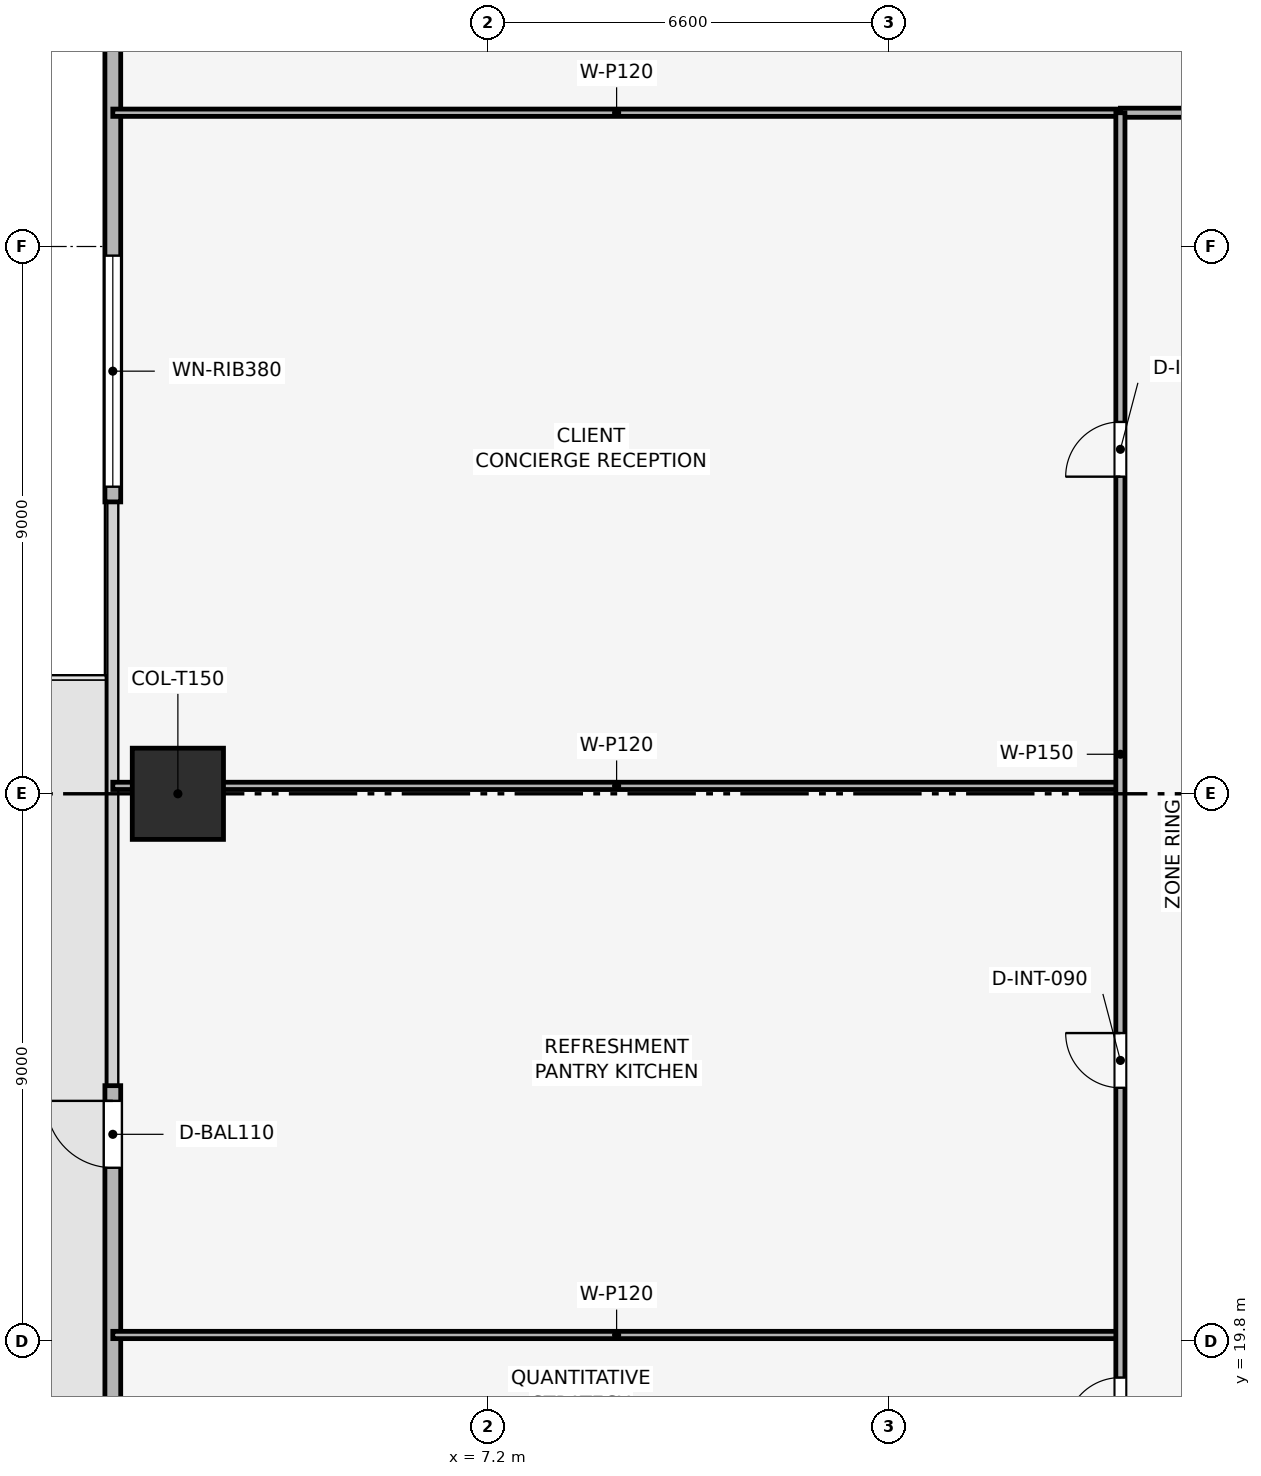
"""IFC4 building model, lengths in metres.
Left out: names, types, materials, properties, quantities, classifications, styles, units other than length and angle.
Written with IfcOpenShell. Run it as: python <this file> out.ifc"""

import sys

from ifc_helpers import new_model, si_unit, direction, frame, frame_2d, origin, origin_2d, place, context, subcontext, project, spatial, rectangle, extrude, element, fill, save


model = new_model("IFC4")
c1 = context("Model", 3, precision=1e-05, world=origin(), true_north=direction((0.0, 1.0)))
c2 = subcontext(c1, "Body", "Model", "MODEL_VIEW")
j1 = project(units=[si_unit("LENGTHUNIT", "METRE"), si_unit("PLANEANGLEUNIT", "RADIAN")], contexts=[c1])
p1 = place(None, origin())
s1 = spatial("IfcSite", under=j1, at=p1, CompositionType="ELEMENT")
p2 = place(p1, origin())
s2 = spatial("IfcBuilding", under=s1, at=p2, CompositionType="ELEMENT")
p3 = place(p2, frame((0.0, 0.0, 37.8)))
s3 = spatial("IfcBuildingStorey", under=s2, at=p3, CompositionType="ELEMENT", Elevation=37.8)
p4 = place(p3, frame((2.1, 28.8, 0.003), z_axis=(0.0, 0.0, 1.0), x_axis=(1.0, 0.0, 0.0)))
e1 = element("IfcColumn", 1, at=p4, inside=s3, PredefinedType="COLUMN", context=c2, shape_type="SweptSolid", body=[
    extrude(rectangle(XDim=1.5, YDim=1.5, at=origin_2d()), origin(), (0.0, 0.0, 1.0), 3.644),
])
p5 = place(p3, frame((1.03, 8.7, 0.0), z_axis=(0.0, 0.0, 1.0), x_axis=(0.0, 1.0, 0.0)))
e2 = element("IfcWall", 2, at=p5, inside=s3, PredefinedType="SOLIDWALL", context=c2, shape_type="SweptSolid", body=[
    extrude(rectangle(XDim=15.3, YDim=0.26, at=frame_2d((7.65, 0.0))), origin(), (0.0, 0.0, 1.0), 3.65),
])
p6 = place(p5, frame((13.95, 0.0, 0.0)))
e3 = element("IfcOpeningElement", 3, at=p6, cuts=e2, PredefinedType="OPENING", context=c2, shape_type="SweptSolid", body=[
    extrude(rectangle(XDim=1.1, YDim=2.2, at=frame_2d((0.55, 1.1))), frame((0.0, 0.14, 0.0), z_axis=(0.0, -1.0, 0.0), x_axis=(1.0, 0.0, 0.0)), (0.0, 0.0, 1.0), 0.28),
])
p7 = place(p3, frame((1.03, 33.6, 0.0), z_axis=(0.0, 0.0, 1.0), x_axis=(0.0, 1.0, 0.0)))
e4 = element("IfcWall", 4, at=p7, inside=s3, PredefinedType="SOLIDWALL", context=c2, shape_type="SweptSolid", body=[
    extrude(rectangle(XDim=15.3, YDim=0.26, at=frame_2d((7.65, 0.0))), origin(), (0.0, 0.0, 1.0), 3.65),
])
p8 = place(p7, frame((0.25, 0.0, 0.9)))
e5 = element("IfcOpeningElement", 5, at=p8, cuts=e4, PredefinedType="OPENING", context=c2, shape_type="SweptSolid", body=[
    extrude(rectangle(XDim=3.8, YDim=1.9, at=frame_2d((1.9, 0.95))), frame((0.0, 0.14, 0.0), z_axis=(0.0, -1.0, 0.0), x_axis=(1.0, 0.0, 0.0)), (0.0, 0.0, 1.0), 0.28),
])
for number, where, z_axis, x_axis in (
    (6, (1.03, 40.0, 0.0), (0.0, 0.0, 1.0), (1.0, 0.0, 0.0)),
    (7, (1.03, 19.9, 0.0), (0.0, 0.0, 1.0), (1.0, 0.0, 0.0)),
):
    element("IfcWall", number, at=place(p3, frame(where, z_axis=z_axis, x_axis=x_axis)), inside=s3, PredefinedType="PARTITIONING", context=c2, shape_type="SweptSolid", body=[
        extrude(rectangle(XDim=16.57, YDim=0.12, at=frame_2d((8.285, 0.0))), origin(), (0.0, 0.0, 1.0), 2.935),
    ])
p9 = place(p3, frame((1.03, 28.93, 0.0), z_axis=(0.0, 0.0, 1.0), x_axis=(1.0, 0.0, 0.0)))
e8 = element("IfcWall", 8, at=p9, inside=s3, PredefinedType="PARTITIONING", context=c2, shape_type="SweptSolid", body=[
    extrude(rectangle(XDim=16.57, YDim=0.12, at=frame_2d((8.285, 0.0))), origin(), (0.0, 0.0, 1.0), 3.085),
])
p10 = place(p3, frame((17.6, 40.0, 0.0), z_axis=(0.0, 0.0, 1.0), x_axis=(1.0, 0.0, 0.0)))
e9 = element("IfcWall", 9, at=p10, inside=s3, PredefinedType="PARTITIONING", context=c2, shape_type="SweptSolid", body=[
    extrude(rectangle(XDim=22.4, YDim=0.15, at=frame_2d((11.2, 0.0))), origin(), (0.0, 0.0, 1.0), 3.085),
])
p11 = place(p10, frame((10.75, 0.0, 0.0)))
e10 = element("IfcOpeningElement", 10, at=p11, cuts=e9, PredefinedType="OPENING", context=c2, shape_type="SweptSolid", body=[
    extrude(rectangle(XDim=0.9, YDim=2.1, at=frame_2d((0.45, 1.05))), frame((0.0, 0.085, 0.0), z_axis=(0.0, -1.0, 0.0), x_axis=(1.0, 0.0, 0.0)), (0.0, 0.0, 1.0), 0.17),
])
p12 = place(p3, frame((17.6, 17.6, 0.0), z_axis=(0.0, 0.0, 1.0), x_axis=(0.0, 1.0, 0.0)))
e11 = element("IfcWall", 11, at=p12, inside=s3, PredefinedType="PARTITIONING", context=c2, shape_type="SweptSolid", body=[
    extrude(rectangle(XDim=22.4, YDim=0.15, at=frame_2d((11.2, 0.0))), origin(), (0.0, 0.0, 1.0), 3.085),
])
p13 = place(p12, frame((0.7, 0.0, 0.0)))
e12 = element("IfcOpeningElement", 12, at=p13, cuts=e11, PredefinedType="OPENING", context=c2, shape_type="SweptSolid", body=[
    extrude(rectangle(XDim=0.9, YDim=2.1, at=frame_2d((0.45, 1.05))), frame((0.0, 0.085, 0.0), z_axis=(0.0, -1.0, 0.0), x_axis=(1.0, 0.0, 0.0)), (0.0, 0.0, 1.0), 0.17),
])
p14 = place(p12, frame((6.365, 0.0, 0.0)))
e13 = element("IfcOpeningElement", 13, at=p14, cuts=e11, PredefinedType="OPENING", context=c2, shape_type="SweptSolid", body=[
    extrude(rectangle(XDim=0.9, YDim=2.1, at=frame_2d((0.45, 1.05))), frame((0.0, 0.085, 0.0), z_axis=(0.0, -1.0, 0.0), x_axis=(1.0, 0.0, 0.0)), (0.0, 0.0, 1.0), 0.17),
])
p15 = place(p12, frame((16.415, 0.0, 0.0)))
e14 = element("IfcOpeningElement", 14, at=p15, cuts=e11, PredefinedType="OPENING", context=c2, shape_type="SweptSolid", body=[
    extrude(rectangle(XDim=0.9, YDim=2.1, at=frame_2d((0.45, 1.05))), frame((0.0, 0.085, 0.0), z_axis=(0.0, -1.0, 0.0), x_axis=(1.0, 0.0, 0.0)), (0.0, 0.0, 1.0), 0.17),
])
p16 = place(p6, origin())
e15 = element("IfcDoor", 15, at=p16, inside=s3, OperationType="SINGLE_SWING_RIGHT", PredefinedType="DOOR", context=c2, shape_type="SweptSolid", body=[
    extrude(rectangle(XDim=1.1, YDim=2.2, at=frame_2d((0.55, 1.1))), frame((0.0, 0.025, 0.0), z_axis=(0.0, -1.0, 0.0), x_axis=(1.0, 0.0, 0.0)), (0.0, 0.0, 1.0), 0.05),
])
fill(e3, e15)
p17 = place(p8, origin())
e16 = element("IfcWindow", 16, at=p17, inside=s3, PartitioningType="SINGLE_PANEL", PredefinedType="WINDOW", context=c2, shape_type="SweptSolid", body=[
    extrude(rectangle(XDim=3.8, YDim=1.9, at=frame_2d((1.9, 0.95))), frame((0.0, 0.03, 0.0), z_axis=(0.0, -1.0, 0.0), x_axis=(1.0, 0.0, 0.0)), (0.0, 0.0, 1.0), 0.06),
])
fill(e5, e16)
p18 = place(p13, origin())
e17 = element("IfcDoor", 17, at=p18, inside=s3, OperationType="SINGLE_SWING_LEFT", PredefinedType="DOOR", context=c2, shape_type="SweptSolid", body=[
    extrude(rectangle(XDim=0.9, YDim=2.1, at=frame_2d((0.45, 1.05))), frame((0.0, 0.025, 0.0), z_axis=(0.0, -1.0, 0.0), x_axis=(1.0, 0.0, 0.0)), (0.0, 0.0, 1.0), 0.05),
])
fill(e12, e17)
p19 = place(p14, origin())
e18 = element("IfcDoor", 18, at=p19, inside=s3, OperationType="SINGLE_SWING_RIGHT", PredefinedType="DOOR", context=c2, shape_type="SweptSolid", body=[
    extrude(rectangle(XDim=0.9, YDim=2.1, at=frame_2d((0.45, 1.05))), frame((0.0, 0.025, 0.0), z_axis=(0.0, -1.0, 0.0), x_axis=(1.0, 0.0, 0.0)), (0.0, 0.0, 1.0), 0.05),
])
fill(e13, e18)
p20 = place(p15, origin())
e19 = element("IfcDoor", 19, at=p20, inside=s3, OperationType="SINGLE_SWING_LEFT", PredefinedType="DOOR", context=c2, shape_type="SweptSolid", body=[
    extrude(rectangle(XDim=0.9, YDim=2.1, at=frame_2d((0.45, 1.05))), frame((0.0, 0.025, 0.0), z_axis=(0.0, -1.0, 0.0), x_axis=(1.0, 0.0, 0.0)), (0.0, 0.0, 1.0), 0.05),
])
fill(e14, e19)
save(model, sys.argv[1])
